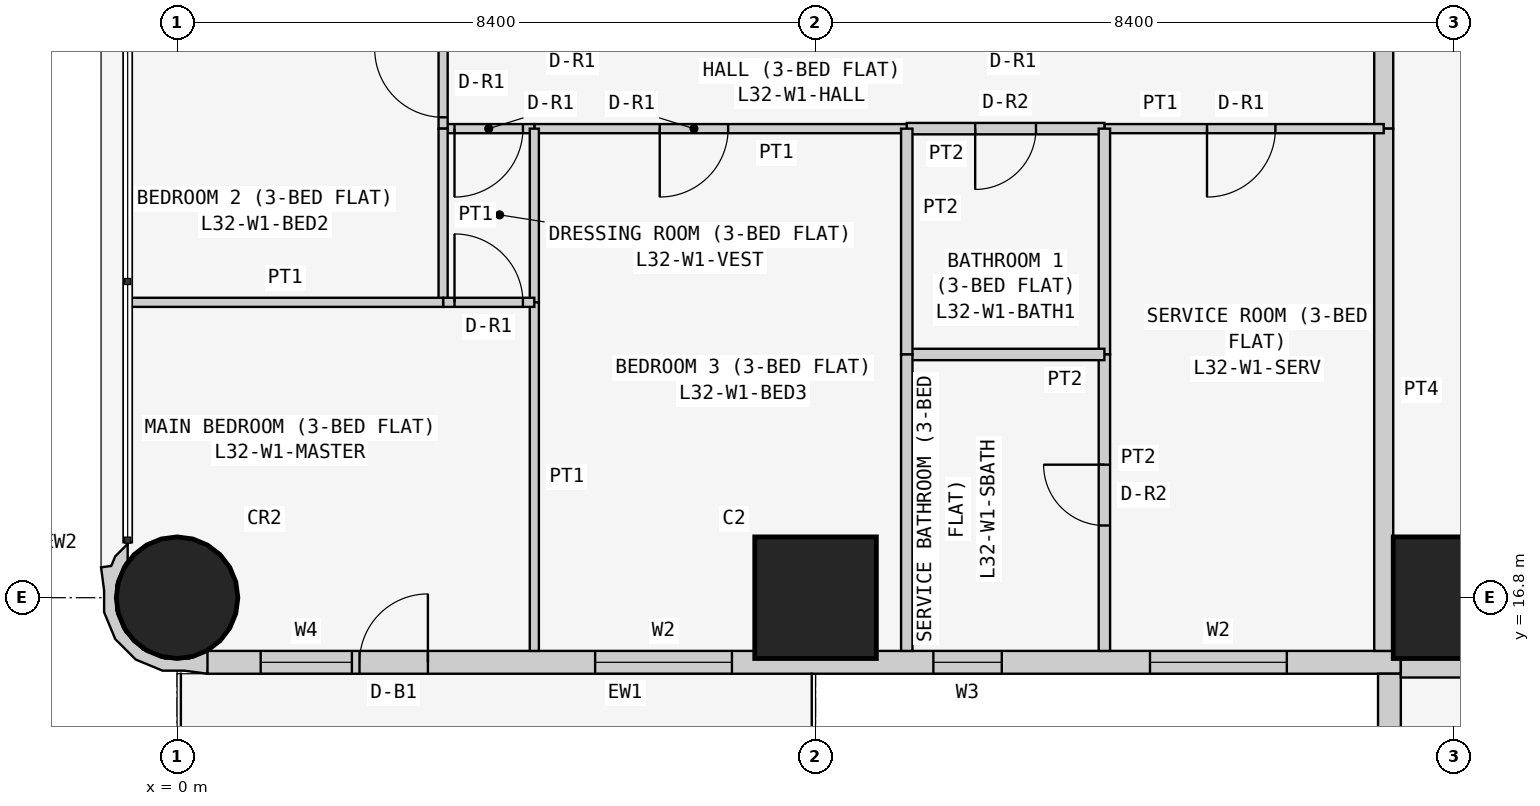
"""IFC4 building model, lengths in metres.
Left out: names, types, materials, properties, quantities, classifications, styles, units other than length and angle.
Written with IfcOpenShell. Run it as: python <this file> out.ifc"""

import sys

from ifc_helpers import new_model, si_unit, direction, frame, frame_2d, origin, origin_2d, place, context, subcontext, project, spatial, polyline, rectangle, circle, outline, extrude, element, fill, save


model = new_model("IFC4")
c1 = context("Model", 3, precision=1e-05, world=origin(), true_north=direction((0.0, 1.0)))
c2 = subcontext(c1, "Body", "Model", "MODEL_VIEW")
j1 = project(units=[si_unit("LENGTHUNIT", "METRE"), si_unit("PLANEANGLEUNIT", "RADIAN")], contexts=[c1])
p1 = place(None, origin())
s1 = spatial("IfcSite", under=j1, at=p1, CompositionType="ELEMENT")
p2 = place(p1, origin())
s2 = spatial("IfcBuilding", under=s1, at=p2, CompositionType="ELEMENT")
p3 = place(p2, frame((0.0, 0.0, 126.9)))
s3 = spatial("IfcBuildingStorey", under=s2, at=p3, CompositionType="ELEMENT", Elevation=126.9)
p4 = place(p3, frame((0.0, 16.8, 0.0), z_axis=(0.0, 0.0, 1.0), x_axis=(1.0, 0.0, 0.0)))
e1 = element("IfcColumn", 1, at=p4, inside=s3, PredefinedType="COLUMN", context=c2, shape_type="SweptSolid", body=[
    extrude(circle(Radius=0.8, at=origin_2d()), origin(), (0.0, 0.0, 1.0), 3.6),
])
for number, where, z_axis, x_axis in (
    (2, (8.4, 16.8, 0.0), (0.0, 0.0, 1.0), (1.0, 0.0, 0.0)),
    (3, (16.8, 16.8, 0.0), (0.0, 0.0, 1.0), (1.0, 0.0, 0.0)),
):
    element("IfcColumn", number, at=place(p3, frame(where, z_axis=z_axis, x_axis=x_axis)), inside=s3, PredefinedType="COLUMN", context=c2, shape_type="SweptSolid", body=[
        extrude(rectangle(XDim=1.6, YDim=1.6, at=origin_2d()), origin(), (0.0, 0.0, 1.0), 3.6),
    ])
p5 = place(p3, frame((0.4, 15.95, 0.0), z_axis=(0.0, 0.0, 1.0), x_axis=(1.0, 0.0, 0.0)))
e4 = element("IfcWall", 4, at=p5, inside=s3, PredefinedType="SOLIDWALL", context=c2, shape_type="SweptSolid", body=[
    extrude(rectangle(XDim=15.7, YDim=0.3, at=frame_2d((7.85, 0.0))), origin(), (0.0, 0.0, 1.0), 3.45),
])
p6 = place(p5, frame((12.4, 0.0, 0.9)))
e5 = element("IfcOpeningElement", 5, at=p6, cuts=e4, PredefinedType="OPENING", context=c2, shape_type="SweptSolid", body=[
    extrude(rectangle(XDim=1.8, YDim=1.5, at=frame_2d((0.9, 0.75))), frame((0.0, 0.16, 0.0), z_axis=(0.0, -1.0, 0.0), x_axis=(1.0, 0.0, 0.0)), (0.0, 0.0, 1.0), 0.32),
])
p7 = place(p5, frame((9.55, 0.0, 1.5)))
e6 = element("IfcOpeningElement", 6, at=p7, cuts=e4, PredefinedType="OPENING", context=c2, shape_type="SweptSolid", body=[
    extrude(rectangle(XDim=0.9, YDim=0.7, at=frame_2d((0.45, 0.35))), frame((0.0, 0.16, 0.0), z_axis=(0.0, -1.0, 0.0), x_axis=(1.0, 0.0, 0.0)), (0.0, 0.0, 1.0), 0.32),
])
p8 = place(p5, frame((5.1, 0.0, 0.9)))
e7 = element("IfcOpeningElement", 7, at=p8, cuts=e4, PredefinedType="OPENING", context=c2, shape_type="SweptSolid", body=[
    extrude(rectangle(XDim=1.8, YDim=1.5, at=frame_2d((0.9, 0.75))), frame((0.0, 0.16, 0.0), z_axis=(0.0, -1.0, 0.0), x_axis=(1.0, 0.0, 0.0)), (0.0, 0.0, 1.0), 0.32),
])
p9 = place(p5, frame((2.0, 0.0, 0.0)))
e8 = element("IfcOpeningElement", 8, at=p9, cuts=e4, PredefinedType="OPENING", context=c2, shape_type="SweptSolid", body=[
    extrude(rectangle(XDim=0.9, YDim=2.4, at=frame_2d((0.45, 1.2))), frame((0.0, 0.16, 0.0), z_axis=(0.0, -1.0, 0.0), x_axis=(1.0, 0.0, 0.0)), (0.0, 0.0, 1.0), 0.32),
])
p10 = place(p5, frame((0.7, 0.0, 0.9)))
e9 = element("IfcOpeningElement", 9, at=p10, cuts=e4, PredefinedType="OPENING", context=c2, shape_type="SweptSolid", body=[
    extrude(rectangle(XDim=1.2, YDim=1.5, at=frame_2d((0.6, 0.75))), frame((0.0, 0.16, 0.0), z_axis=(0.0, -1.0, 0.0), x_axis=(1.0, 0.0, 0.0)), (0.0, 0.0, 1.0), 0.32),
])
p11 = place(p3, frame((15.95, 15.8, 0.0), z_axis=(0.0, 0.0, 1.0), x_axis=(0.0, -1.0, 0.0)))
e10 = element("IfcWall", 10, at=p11, inside=s3, PredefinedType="SOLIDWALL", context=c2, shape_type="SweptSolid", body=[
    extrude(rectangle(XDim=7.0, YDim=0.3, at=frame_2d((3.5, 0.0))), origin(), (0.0, 0.0, 1.0), 3.45),
])
p12 = place(p11, frame((1.5, 0.0, 0.9)))
e11 = element("IfcOpeningElement", 11, at=p12, cuts=e10, PredefinedType="OPENING", context=c2, shape_type="SweptSolid", body=[
    extrude(rectangle(XDim=2.4, YDim=1.5, at=frame_2d((1.2, 0.75))), frame((0.0, 0.16, 0.0), z_axis=(0.0, -1.0, 0.0), x_axis=(1.0, 0.0, 0.0)), (0.0, 0.0, 1.0), 0.32),
])
p13 = place(p11, frame((5.05, 0.0, 0.9)))
e12 = element("IfcOpeningElement", 12, at=p13, cuts=e10, PredefinedType="OPENING", context=c2, shape_type="SweptSolid", body=[
    extrude(rectangle(XDim=1.2, YDim=1.5, at=frame_2d((0.6, 0.75))), frame((0.0, 0.16, 0.0), z_axis=(0.0, -1.0, 0.0), x_axis=(1.0, 0.0, 0.0)), (0.0, 0.0, 1.0), 0.32),
])
p14 = place(p3, frame((-0.595, 17.448, 0.0), z_axis=(0.0, 0.0, 1.0), x_axis=(-0.93923434088, -0.343276641956, 0.0)))
e13 = element("IfcWall", 13, at=p14, inside=s3, PredefinedType="SOLIDWALL", context=c2, shape_type="SweptSolid", body=[
    extrude(outline(polyline([(-0.369, 1.89), (-0.509, 1.621), (-0.491, 1.614), (-0.479, 1.609), (-0.211, 1.62), (0.088, 1.511), (0.323, 1.295), (0.457, 1.006), (0.47, 0.688), (0.361, 0.389), (0.146, 0.154), (0.108, 0.137), (0.031, -0.075), (0.241, 0.023), (0.334, 0.124), (0.465, 0.094), (0.532, 0.393), (0.631, 0.663), (0.614, 1.045), (0.453, 1.391), (0.172, 1.649), (-0.098, 1.748), (-0.369, 1.89)])), origin(), (0.0, 0.0, 1.0), 3.45),
])
p15 = place(p3, frame((22.971, 15.875, 0.0), z_axis=(0.0, 0.0, 1.0), x_axis=(-1.0, 0.0, 0.0)))
e14 = element("IfcWall", 14, at=p15, inside=s3, PredefinedType="PARTITIONING", context=c2, shape_type="SweptSolid", body=[
    extrude(rectangle(XDim=6.871, YDim=0.25, at=frame_2d((3.436, 0.0))), origin(), (0.0, 0.0, 1.0), 3.45),
])
p16 = place(p3, frame((15.875, 22.971, 0.0), z_axis=(0.0, 0.0, 1.0), x_axis=(0.0, 1.0, 0.0)))
e15 = element("IfcWall", 15, at=p16, inside=s3, PredefinedType="PARTITIONING", context=c2, shape_type="SweptSolid", body=[
    extrude(rectangle(XDim=1.2, YDim=0.25, at=frame_2d((0.6, 0.0))), origin(), (0.0, 0.0, 1.0), 3.45),
])
p17 = place(p3, frame((15.875, 16.1, 0.0), z_axis=(0.0, 0.0, 1.0), x_axis=(0.0, 1.0, 0.0)))
e16 = element("IfcWall", 16, at=p17, inside=s3, PredefinedType="PARTITIONING", context=c2, shape_type="SweptSolid", body=[
    extrude(rectangle(XDim=6.871, YDim=0.25, at=frame_2d((3.436, 0.0))), origin(), (0.0, 0.0, 1.0), 3.45),
])
p18 = place(p3, frame((12.2, 22.971, 0.0), z_axis=(0.0, 0.0, 1.0), x_axis=(1.0, 0.0, 0.0)))
e17 = element("IfcWall", 17, at=p18, inside=s3, PredefinedType="PARTITIONING", context=c2, shape_type="SweptSolid", body=[
    extrude(rectangle(XDim=3.675, YDim=0.12, at=frame_2d((1.837, 0.0))), origin(), (0.0, 0.0, 1.0), 3.45),
])
p19 = place(p18, frame((1.35, 0.0, 0.0)))
e18 = element("IfcOpeningElement", 18, at=p19, cuts=e17, PredefinedType="OPENING", context=c2, shape_type="SweptSolid", body=[
    extrude(rectangle(XDim=0.9, YDim=2.1, at=frame_2d((0.45, 1.05))), frame((0.0, 0.07, 0.0), z_axis=(0.0, -1.0, 0.0), x_axis=(1.0, 0.0, 0.0)), (0.0, 0.0, 1.0), 0.14),
])
p20 = place(p3, frame((9.6, 22.971, 0.0), z_axis=(0.0, 0.0, 1.0), x_axis=(1.0, 0.0, 0.0)))
e19 = element("IfcWall", 19, at=p20, inside=s3, PredefinedType="PARTITIONING", context=c2, shape_type="SweptSolid", body=[
    extrude(rectangle(XDim=2.6, YDim=0.15, at=frame_2d((1.3, 0.0))), origin(), (0.0, 0.0, 1.0), 3.45),
])
p21 = place(p20, frame((0.9, 0.0, 0.0)))
e20 = element("IfcOpeningElement", 20, at=p21, cuts=e19, PredefinedType="OPENING", context=c2, shape_type="SweptSolid", body=[
    extrude(rectangle(XDim=0.8, YDim=2.1, at=frame_2d((0.4, 1.05))), frame((0.0, 0.085, 0.0), z_axis=(0.0, -1.0, 0.0), x_axis=(1.0, 0.0, 0.0)), (0.0, 0.0, 1.0), 0.17),
])
p22 = place(p3, frame((4.7, 22.971, 0.0), z_axis=(0.0, 0.0, 1.0), x_axis=(1.0, 0.0, 0.0)))
e21 = element("IfcWall", 21, at=p22, inside=s3, PredefinedType="PARTITIONING", context=c2, shape_type="SweptSolid", body=[
    extrude(rectangle(XDim=4.9, YDim=0.12, at=frame_2d((2.45, 0.0))), origin(), (0.0, 0.0, 1.0), 3.45),
])
p23 = place(p22, frame((1.65, 0.0, 0.0)))
e22 = element("IfcOpeningElement", 22, at=p23, cuts=e21, PredefinedType="OPENING", context=c2, shape_type="SweptSolid", body=[
    extrude(rectangle(XDim=0.9, YDim=2.1, at=frame_2d((0.45, 1.05))), frame((0.0, 0.07, 0.0), z_axis=(0.0, -1.0, 0.0), x_axis=(1.0, 0.0, 0.0)), (0.0, 0.0, 1.0), 0.14),
])
p24 = place(p3, frame((3.5, 22.971, 0.0), z_axis=(0.0, 0.0, 1.0), x_axis=(1.0, 0.0, 0.0)))
e23 = element("IfcWall", 23, at=p24, inside=s3, PredefinedType="PARTITIONING", context=c2, shape_type="SweptSolid", body=[
    extrude(rectangle(XDim=1.2, YDim=0.12, at=frame_2d((0.6, 0.0))), origin(), (0.0, 0.0, 1.0), 3.45),
])
p25 = place(p24, frame((0.15, 0.0, 0.0)))
e24 = element("IfcOpeningElement", 24, at=p25, cuts=e23, PredefinedType="OPENING", context=c2, shape_type="SweptSolid", body=[
    extrude(rectangle(XDim=0.9, YDim=2.1, at=frame_2d((0.45, 1.05))), frame((0.0, 0.07, 0.0), z_axis=(0.0, -1.0, 0.0), x_axis=(1.0, 0.0, 0.0)), (0.0, 0.0, 1.0), 0.14),
])
p26 = place(p3, frame((3.5, 24.171, 0.0), z_axis=(0.0, 0.0, 1.0), x_axis=(0.0, -1.0, 0.0)))
e25 = element("IfcWall", 25, at=p26, inside=s3, PredefinedType="PARTITIONING", context=c2, shape_type="SweptSolid", body=[
    extrude(rectangle(XDim=1.2, YDim=0.12, at=frame_2d((0.6, 0.0))), origin(), (0.0, 0.0, 1.0), 3.45),
])
p27 = place(p26, frame((0.151, 0.0, 0.0)))
e26 = element("IfcOpeningElement", 26, at=p27, cuts=e25, PredefinedType="OPENING", context=c2, shape_type="SweptSolid", body=[
    extrude(rectangle(XDim=0.9, YDim=2.1, at=frame_2d((0.45, 1.05))), frame((0.0, 0.07, 0.0), z_axis=(0.0, -1.0, 0.0), x_axis=(1.0, 0.0, 0.0)), (0.0, 0.0, 1.0), 0.14),
])
p28 = place(p3, frame((12.2, 22.971, 0.0), z_axis=(0.0, 0.0, 1.0), x_axis=(0.0, -1.0, 0.0)))
e27 = element("IfcWall", 27, at=p28, inside=s3, PredefinedType="PARTITIONING", context=c2, shape_type="SweptSolid", body=[
    extrude(rectangle(XDim=2.971, YDim=0.15, at=frame_2d((1.485, 0.0))), origin(), (0.0, 0.0, 1.0), 3.45),
])
p29 = place(p3, frame((12.2, 20.0, 0.0), z_axis=(0.0, 0.0, 1.0), x_axis=(0.0, -1.0, 0.0)))
e28 = element("IfcWall", 28, at=p29, inside=s3, PredefinedType="PARTITIONING", context=c2, shape_type="SweptSolid", body=[
    extrude(rectangle(XDim=3.9, YDim=0.15, at=frame_2d((1.95, 0.0))), origin(), (0.0, 0.0, 1.0), 3.45),
])
p30 = place(p29, frame((1.45, 0.0, 0.0)))
e29 = element("IfcOpeningElement", 29, at=p30, cuts=e28, PredefinedType="OPENING", context=c2, shape_type="SweptSolid", body=[
    extrude(rectangle(XDim=0.8, YDim=2.1, at=frame_2d((0.4, 1.05))), frame((0.0, 0.085, 0.0), z_axis=(0.0, -1.0, 0.0), x_axis=(1.0, 0.0, 0.0)), (0.0, 0.0, 1.0), 0.17),
])
p31 = place(p3, frame((9.6, 20.0, 0.0), z_axis=(0.0, 0.0, 1.0), x_axis=(1.0, 0.0, 0.0)))
e30 = element("IfcWall", 30, at=p31, inside=s3, PredefinedType="PARTITIONING", context=c2, shape_type="SweptSolid", body=[
    extrude(rectangle(XDim=2.6, YDim=0.15, at=frame_2d((1.3, 0.0))), origin(), (0.0, 0.0, 1.0), 3.45),
])
p32 = place(p3, frame((9.6, 22.971, 0.0), z_axis=(0.0, 0.0, 1.0), x_axis=(0.0, -1.0, 0.0)))
e31 = element("IfcWall", 31, at=p32, inside=s3, PredefinedType="PARTITIONING", context=c2, shape_type="SweptSolid", body=[
    extrude(rectangle(XDim=2.971, YDim=0.15, at=frame_2d((1.485, 0.0))), origin(), (0.0, 0.0, 1.0), 3.45),
])
p33 = place(p3, frame((9.6, 20.0, 0.0), z_axis=(0.0, 0.0, 1.0), x_axis=(0.0, -1.0, 0.0)))
e32 = element("IfcWall", 32, at=p33, inside=s3, PredefinedType="PARTITIONING", context=c2, shape_type="SweptSolid", body=[
    extrude(rectangle(XDim=3.9, YDim=0.15, at=frame_2d((1.95, 0.0))), origin(), (0.0, 0.0, 1.0), 3.45),
])
p34 = place(p3, frame((4.7, 22.971, 0.0), z_axis=(0.0, 0.0, 1.0), x_axis=(0.0, -1.0, 0.0)))
e33 = element("IfcWall", 33, at=p34, inside=s3, PredefinedType="PARTITIONING", context=c2, shape_type="SweptSolid", body=[
    extrude(rectangle(XDim=2.285, YDim=0.12, at=frame_2d((1.143, 0.0))), origin(), (0.0, 0.0, 1.0), 3.45),
])
p35 = place(p3, frame((4.7, 20.686, 0.0), z_axis=(0.0, 0.0, 1.0), x_axis=(0.0, -1.0, 0.0)))
e34 = element("IfcWall", 34, at=p35, inside=s3, PredefinedType="PARTITIONING", context=c2, shape_type="SweptSolid", body=[
    extrude(rectangle(XDim=4.586, YDim=0.12, at=frame_2d((2.293, 0.0))), origin(), (0.0, 0.0, 1.0), 3.45),
])
p36 = place(p3, frame((3.5, 22.971, 0.0), z_axis=(0.0, 0.0, 1.0), x_axis=(0.0, -1.0, 0.0)))
e35 = element("IfcWall", 35, at=p36, inside=s3, PredefinedType="PARTITIONING", context=c2, shape_type="SweptSolid", body=[
    extrude(rectangle(XDim=2.285, YDim=0.12, at=frame_2d((1.143, 0.0))), origin(), (0.0, 0.0, 1.0), 3.45),
])
p37 = place(p3, frame((3.5, 20.686, 0.0), z_axis=(0.0, 0.0, 1.0), x_axis=(1.0, 0.0, 0.0)))
e36 = element("IfcWall", 36, at=p37, inside=s3, PredefinedType="PARTITIONING", context=c2, shape_type="SweptSolid", body=[
    extrude(rectangle(XDim=1.2, YDim=0.12, at=frame_2d((0.6, 0.0))), origin(), (0.0, 0.0, 1.0), 3.45),
])
p38 = place(p37, frame((0.15, 0.0, 0.0)))
e37 = element("IfcOpeningElement", 37, at=p38, cuts=e36, PredefinedType="OPENING", context=c2, shape_type="SweptSolid", body=[
    extrude(rectangle(XDim=0.9, YDim=2.1, at=frame_2d((0.45, 1.05))), frame((0.0, 0.07, 0.0), z_axis=(0.0, -1.0, 0.0), x_axis=(1.0, 0.0, 0.0)), (0.0, 0.0, 1.0), 0.14),
])
p39 = place(p3, frame((-0.65, 20.686, 0.0), z_axis=(0.0, 0.0, 1.0), x_axis=(1.0, 0.0, 0.0)))
e38 = element("IfcWall", 38, at=p39, inside=s3, PredefinedType="PARTITIONING", context=c2, shape_type="SweptSolid", body=[
    extrude(rectangle(XDim=4.15, YDim=0.12, at=frame_2d((2.075, 0.0))), origin(), (0.0, 0.0, 1.0), 3.45),
])
p40 = place(p6, origin())
e39 = element("IfcWindow", 39, at=p40, inside=s3, PartitioningType="SINGLE_PANEL", PredefinedType="WINDOW", context=c2, shape_type="SweptSolid", body=[
    extrude(rectangle(XDim=1.8, YDim=1.5, at=frame_2d((0.9, 0.75))), frame((0.0, 0.03, 0.0), z_axis=(0.0, -1.0, 0.0), x_axis=(1.0, 0.0, 0.0)), (0.0, 0.0, 1.0), 0.06),
])
fill(e5, e39)
p41 = place(p7, origin())
e40 = element("IfcWindow", 40, at=p41, inside=s3, PartitioningType="SINGLE_PANEL", PredefinedType="WINDOW", context=c2, shape_type="SweptSolid", body=[
    extrude(rectangle(XDim=0.9, YDim=0.7, at=frame_2d((0.45, 0.35))), frame((0.0, 0.03, 0.0), z_axis=(0.0, -1.0, 0.0), x_axis=(1.0, 0.0, 0.0)), (0.0, 0.0, 1.0), 0.06),
])
fill(e6, e40)
p42 = place(p8, origin())
e41 = element("IfcWindow", 41, at=p42, inside=s3, PartitioningType="SINGLE_PANEL", PredefinedType="WINDOW", context=c2, shape_type="SweptSolid", body=[
    extrude(rectangle(XDim=1.8, YDim=1.5, at=frame_2d((0.9, 0.75))), frame((0.0, 0.03, 0.0), z_axis=(0.0, -1.0, 0.0), x_axis=(1.0, 0.0, 0.0)), (0.0, 0.0, 1.0), 0.06),
])
fill(e7, e41)
p43 = place(p9, origin())
e42 = element("IfcDoor", 42, at=p43, inside=s3, OperationType="SINGLE_SWING_RIGHT", PredefinedType="DOOR", context=c2, shape_type="SweptSolid", body=[
    extrude(rectangle(XDim=0.9, YDim=2.4, at=frame_2d((0.45, 1.2))), frame((0.0, 0.025, 0.0), z_axis=(0.0, -1.0, 0.0), x_axis=(1.0, 0.0, 0.0)), (0.0, 0.0, 1.0), 0.05),
])
fill(e8, e42)
p44 = place(p10, origin())
e43 = element("IfcWindow", 43, at=p44, inside=s3, PartitioningType="SINGLE_PANEL", PredefinedType="WINDOW", context=c2, shape_type="SweptSolid", body=[
    extrude(rectangle(XDim=1.2, YDim=1.5, at=frame_2d((0.6, 0.75))), frame((0.0, 0.03, 0.0), z_axis=(0.0, -1.0, 0.0), x_axis=(1.0, 0.0, 0.0)), (0.0, 0.0, 1.0), 0.06),
])
fill(e9, e43)
p45 = place(p19, frame((0.9, 0.0, 0.0), z_axis=(0.0, 0.0, 1.0), x_axis=(-1.0, 0.0, 0.0)))
e44 = element("IfcDoor", 44, at=p45, inside=s3, OperationType="SINGLE_SWING_RIGHT", PredefinedType="DOOR", context=c2, shape_type="SweptSolid", body=[
    extrude(rectangle(XDim=0.9, YDim=2.1, at=frame_2d((0.45, 1.05))), frame((0.0, 0.025, 0.0), z_axis=(0.0, -1.0, 0.0), x_axis=(1.0, 0.0, 0.0)), (0.0, 0.0, 1.0), 0.05),
])
fill(e18, e44)
p46 = place(p30, frame((0.8, 0.0, 0.0), z_axis=(0.0, 0.0, 1.0), x_axis=(-1.0, 0.0, 0.0)))
e45 = element("IfcDoor", 45, at=p46, inside=s3, OperationType="SINGLE_SWING_RIGHT", PredefinedType="DOOR", context=c2, shape_type="SweptSolid", body=[
    extrude(rectangle(XDim=0.8, YDim=2.1, at=frame_2d((0.4, 1.05))), frame((0.0, 0.025, 0.0), z_axis=(0.0, -1.0, 0.0), x_axis=(1.0, 0.0, 0.0)), (0.0, 0.0, 1.0), 0.05),
])
fill(e29, e45)
p47 = place(p21, frame((0.8, 0.0, 0.0), z_axis=(0.0, 0.0, 1.0), x_axis=(-1.0, 0.0, 0.0)))
e46 = element("IfcDoor", 46, at=p47, inside=s3, OperationType="SINGLE_SWING_RIGHT", PredefinedType="DOOR", context=c2, shape_type="SweptSolid", body=[
    extrude(rectangle(XDim=0.8, YDim=2.1, at=frame_2d((0.4, 1.05))), frame((0.0, 0.025, 0.0), z_axis=(0.0, -1.0, 0.0), x_axis=(1.0, 0.0, 0.0)), (0.0, 0.0, 1.0), 0.05),
])
fill(e20, e46)
p48 = place(p23, frame((0.9, 0.0, 0.0), z_axis=(0.0, 0.0, 1.0), x_axis=(-1.0, 0.0, 0.0)))
e47 = element("IfcDoor", 47, at=p48, inside=s3, OperationType="SINGLE_SWING_RIGHT", PredefinedType="DOOR", context=c2, shape_type="SweptSolid", body=[
    extrude(rectangle(XDim=0.9, YDim=2.1, at=frame_2d((0.45, 1.05))), frame((0.0, 0.025, 0.0), z_axis=(0.0, -1.0, 0.0), x_axis=(1.0, 0.0, 0.0)), (0.0, 0.0, 1.0), 0.05),
])
fill(e22, e47)
p49 = place(p25, frame((0.9, 0.0, 0.0), z_axis=(0.0, 0.0, 1.0), x_axis=(-1.0, 0.0, 0.0)))
e48 = element("IfcDoor", 48, at=p49, inside=s3, OperationType="SINGLE_SWING_RIGHT", PredefinedType="DOOR", context=c2, shape_type="SweptSolid", body=[
    extrude(rectangle(XDim=0.9, YDim=2.1, at=frame_2d((0.45, 1.05))), frame((0.0, 0.025, 0.0), z_axis=(0.0, -1.0, 0.0), x_axis=(1.0, 0.0, 0.0)), (0.0, 0.0, 1.0), 0.05),
])
fill(e24, e48)
p50 = place(p38, origin())
e49 = element("IfcDoor", 49, at=p50, inside=s3, OperationType="SINGLE_SWING_LEFT", PredefinedType="DOOR", context=c2, shape_type="SweptSolid", body=[
    extrude(rectangle(XDim=0.9, YDim=2.1, at=frame_2d((0.45, 1.05))), frame((0.0, 0.025, 0.0), z_axis=(0.0, -1.0, 0.0), x_axis=(1.0, 0.0, 0.0)), (0.0, 0.0, 1.0), 0.05),
])
fill(e37, e49)
p51 = place(p27, frame((0.9, 0.0, 0.0), z_axis=(0.0, 0.0, 1.0), x_axis=(-1.0, 0.0, 0.0)))
e50 = element("IfcDoor", 50, at=p51, inside=s3, OperationType="SINGLE_SWING_RIGHT", PredefinedType="DOOR", context=c2, shape_type="SweptSolid", body=[
    extrude(rectangle(XDim=0.9, YDim=2.1, at=frame_2d((0.45, 1.05))), frame((0.0, 0.025, 0.0), z_axis=(0.0, -1.0, 0.0), x_axis=(1.0, 0.0, 0.0)), (0.0, 0.0, 1.0), 0.05),
])
fill(e26, e50)
save(model, sys.argv[1])
